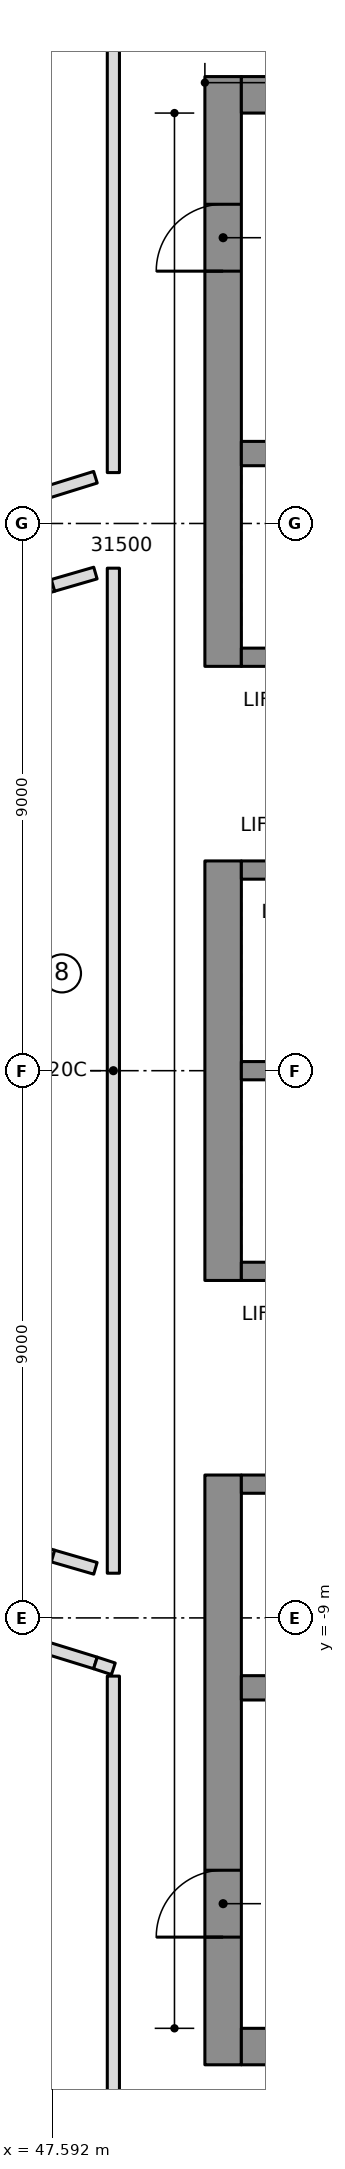
"""IFC4 building model, lengths in metres.
Left out: names, types, materials, properties, quantities, classifications, styles, units other than length and angle.
Written with IfcOpenShell. Run it as: python <this file> out.ifc"""

import sys

from ifc_helpers import new_model, si_unit, direction, frame, frame_2d, origin, place, context, subcontext, project, spatial, rectangle, extrude, element, fill, save


model = new_model("IFC4")
c1 = context("Model", 3, precision=1e-05, world=origin(), true_north=direction((0.0, 1.0)))
c2 = subcontext(c1, "Body", "Model", "MODEL_VIEW")
j1 = project(units=[si_unit("LENGTHUNIT", "METRE"), si_unit("PLANEANGLEUNIT", "RADIAN")], contexts=[c1])
p1 = place(None, origin())
s1 = spatial("IfcSite", under=j1, at=p1, CompositionType="ELEMENT")
p2 = place(p1, origin())
s2 = spatial("IfcBuilding", under=s1, at=p2, CompositionType="ELEMENT")
p3 = place(p2, frame((0.0, 0.0, 235.0)))
s3 = spatial("IfcBuildingStorey", under=s2, at=p3, CompositionType="ELEMENT", Elevation=235.0)
p4 = place(p3, frame((50.4, 6.65, 0.0), z_axis=(0.0, 0.0, 1.0), x_axis=(0.0, 1.0, 0.0)))
e1 = element("IfcWall", 1, at=p4, inside=s3, PredefinedType="SHEAR", context=c2, shape_type="SweptSolid", body=[
    extrude(rectangle(XDim=9.7, YDim=0.6, at=frame_2d((4.85, 0.0))), origin(), (0.0, 0.0, 1.0), 3.55),
])
p5 = place(p4, frame((6.5, 0.0, 0.0)))
e2 = element("IfcOpeningElement", 2, at=p5, cuts=e1, PredefinedType="OPENING", context=c2, shape_type="SweptSolid", body=[
    extrude(rectangle(XDim=1.1, YDim=2.1, at=frame_2d((0.55, 1.05))), frame((0.0, 0.31, 0.0), z_axis=(0.0, -1.0, 0.0), x_axis=(1.0, 0.0, 0.0)), (0.0, 0.0, 1.0), 0.62),
])
p6 = place(p3, frame((50.4, -3.45, 0.0), z_axis=(0.0, 0.0, 1.0), x_axis=(0.0, 1.0, 0.0)))
e3 = element("IfcWall", 3, at=p6, inside=s3, PredefinedType="SHEAR", context=c2, shape_type="SweptSolid", body=[
    extrude(rectangle(XDim=6.9, YDim=0.6, at=frame_2d((3.45, 0.0))), origin(), (0.0, 0.0, 1.0), 3.55),
])
p7 = place(p3, frame((50.4, -16.35, 0.0), z_axis=(0.0, 0.0, 1.0), x_axis=(0.0, 1.0, 0.0)))
e4 = element("IfcWall", 4, at=p7, inside=s3, PredefinedType="SHEAR", context=c2, shape_type="SweptSolid", body=[
    extrude(rectangle(XDim=9.7, YDim=0.6, at=frame_2d((4.85, 0.0))), origin(), (0.0, 0.0, 1.0), 3.55),
])
p8 = place(p7, frame((2.1, 0.0, 0.0)))
e5 = element("IfcOpeningElement", 5, at=p8, cuts=e4, PredefinedType="OPENING", context=c2, shape_type="SweptSolid", body=[
    extrude(rectangle(XDim=1.1, YDim=2.1, at=frame_2d((0.55, 1.05))), frame((0.0, 0.31, 0.0), z_axis=(0.0, -1.0, 0.0), x_axis=(1.0, 0.0, 0.0)), (0.0, 0.0, 1.0), 0.62),
])
for number, where, z_axis, x_axis in (
    (6, (50.7, 16.05, 0.0), (0.0, 0.0, 1.0), (1.0, 0.0, 0.0)),
    (7, (50.7, -16.05, 0.0), (0.0, 0.0, 1.0), (1.0, 0.0, 0.0)),
):
    element("IfcWall", number, at=place(p3, frame(where, z_axis=z_axis, x_axis=x_axis)), inside=s3, PredefinedType="SHEAR", context=c2, shape_type="SweptSolid", body=[
        extrude(rectangle(XDim=13.62, YDim=0.6, at=frame_2d((6.81, 0.0))), origin(), (0.0, 0.0, 1.0), 3.55),
    ])
p9 = place(p3, frame((50.7, 10.15, 0.0), z_axis=(0.0, 0.0, 1.0), x_axis=(1.0, 0.0, 0.0)))
e8 = element("IfcWall", 8, at=p9, inside=s3, PredefinedType="SHEAR", context=c2, shape_type="SweptSolid", body=[
    extrude(rectangle(XDim=13.02, YDim=0.4, at=frame_2d((6.51, 0.0))), origin(), (0.0, 0.0, 1.0), 3.55),
])
p10 = place(p9, frame((0.7, 0.0, 0.0)))
e9 = element("IfcOpeningElement", 9, at=p10, cuts=e8, PredefinedType="OPENING", context=c2, shape_type="SweptSolid", body=[
    extrude(rectangle(XDim=1.1, YDim=2.1, at=frame_2d((0.55, 1.05))), frame((0.0, 0.21, 0.0), z_axis=(0.0, -1.0, 0.0), x_axis=(1.0, 0.0, 0.0)), (0.0, 0.0, 1.0), 0.42),
])
p11 = place(p9, frame((3.5, 0.0, 0.0)))
e10 = element("IfcOpeningElement", 10, at=p11, cuts=e8, PredefinedType="OPENING", context=c2, shape_type="SweptSolid", body=[
    extrude(rectangle(XDim=1.1, YDim=2.1, at=frame_2d((0.55, 1.05))), frame((0.0, 0.21, 0.0), z_axis=(0.0, -1.0, 0.0), x_axis=(1.0, 0.0, 0.0)), (0.0, 0.0, 1.0), 0.42),
])
p12 = place(p3, frame((50.7, -10.15, 0.0), z_axis=(0.0, 0.0, 1.0), x_axis=(1.0, 0.0, 0.0)))
e11 = element("IfcWall", 11, at=p12, inside=s3, PredefinedType="SHEAR", context=c2, shape_type="SweptSolid", body=[
    extrude(rectangle(XDim=13.02, YDim=0.4, at=frame_2d((6.51, 0.0))), origin(), (0.0, 0.0, 1.0), 3.55),
])
p13 = place(p3, frame((50.7, 0.0, 0.0), z_axis=(0.0, 0.0, 1.0), x_axis=(1.0, 0.0, 0.0)))
e12 = element("IfcWall", 12, at=p13, inside=s3, PredefinedType="SHEAR", context=c2, shape_type="SweptSolid", body=[
    extrude(rectangle(XDim=10.9, YDim=0.3, at=frame_2d((5.45, 0.0))), origin(), (0.0, 0.0, 1.0), 3.55),
])
p14 = place(p3, frame((50.7, 3.3, 0.0), z_axis=(0.0, 0.0, 1.0), x_axis=(1.0, 0.0, 0.0)))
e13 = element("IfcWall", 13, at=p14, inside=s3, PredefinedType="SHEAR", context=c2, shape_type="SweptSolid", body=[
    extrude(rectangle(XDim=10.9, YDim=0.3, at=frame_2d((5.45, 0.0))), origin(), (0.0, 0.0, 1.0), 3.55),
])
p15 = place(p14, frame((0.7, 0.0, 0.0)))
e14 = element("IfcOpeningElement", 14, at=p15, cuts=e13, PredefinedType="OPENING", context=c2, shape_type="SweptSolid", body=[
    extrude(rectangle(XDim=1.1, YDim=2.1, at=frame_2d((0.55, 1.05))), frame((0.0, 0.16, 0.0), z_axis=(0.0, -1.0, 0.0), x_axis=(1.0, 0.0, 0.0)), (0.0, 0.0, 1.0), 0.32),
])
p16 = place(p14, frame((3.5, 0.0, 0.0)))
e15 = element("IfcOpeningElement", 15, at=p16, cuts=e13, PredefinedType="OPENING", context=c2, shape_type="SweptSolid", body=[
    extrude(rectangle(XDim=1.1, YDim=2.1, at=frame_2d((0.55, 1.05))), frame((0.0, 0.16, 0.0), z_axis=(0.0, -1.0, 0.0), x_axis=(1.0, 0.0, 0.0)), (0.0, 0.0, 1.0), 0.32),
])
p17 = place(p14, frame((6.4, 0.0, 0.0)))
e16 = element("IfcOpeningElement", 16, at=p17, cuts=e13, PredefinedType="OPENING", context=c2, shape_type="SweptSolid", body=[
    extrude(rectangle(XDim=0.9, YDim=2.1, at=frame_2d((0.45, 1.05))), frame((0.0, 0.16, 0.0), z_axis=(0.0, -1.0, 0.0), x_axis=(1.0, 0.0, 0.0)), (0.0, 0.0, 1.0), 0.32),
])
p18 = place(p14, frame((9.2, 0.0, 0.0)))
e17 = element("IfcOpeningElement", 17, at=p18, cuts=e13, PredefinedType="OPENING", context=c2, shape_type="SweptSolid", body=[
    extrude(rectangle(XDim=0.9, YDim=2.1, at=frame_2d((0.45, 1.05))), frame((0.0, 0.16, 0.0), z_axis=(0.0, -1.0, 0.0), x_axis=(1.0, 0.0, 0.0)), (0.0, 0.0, 1.0), 0.32),
])
p19 = place(p3, frame((50.7, 6.8, 0.0), z_axis=(0.0, 0.0, 1.0), x_axis=(1.0, 0.0, 0.0)))
e18 = element("IfcWall", 18, at=p19, inside=s3, PredefinedType="SHEAR", context=c2, shape_type="SweptSolid", body=[
    extrude(rectangle(XDim=10.9, YDim=0.3, at=frame_2d((5.45, 0.0))), origin(), (0.0, 0.0, 1.0), 3.55),
])
p20 = place(p19, frame((6.4, 0.0, 0.0)))
e19 = element("IfcOpeningElement", 19, at=p20, cuts=e18, PredefinedType="OPENING", context=c2, shape_type="SweptSolid", body=[
    extrude(rectangle(XDim=0.9, YDim=2.1, at=frame_2d((0.45, 1.05))), frame((0.0, 0.16, 0.0), z_axis=(0.0, -1.0, 0.0), x_axis=(1.0, 0.0, 0.0)), (0.0, 0.0, 1.0), 0.32),
])
p21 = place(p19, frame((9.2, 0.0, 0.0)))
e20 = element("IfcOpeningElement", 20, at=p21, cuts=e18, PredefinedType="OPENING", context=c2, shape_type="SweptSolid", body=[
    extrude(rectangle(XDim=0.9, YDim=2.1, at=frame_2d((0.45, 1.05))), frame((0.0, 0.16, 0.0), z_axis=(0.0, -1.0, 0.0), x_axis=(1.0, 0.0, 0.0)), (0.0, 0.0, 1.0), 0.32),
])
p22 = place(p3, frame((50.7, -3.3, 0.0), z_axis=(0.0, 0.0, 1.0), x_axis=(1.0, 0.0, 0.0)))
e21 = element("IfcWall", 21, at=p22, inside=s3, PredefinedType="SHEAR", context=c2, shape_type="SweptSolid", body=[
    extrude(rectangle(XDim=10.9, YDim=0.3, at=frame_2d((5.45, 0.0))), origin(), (0.0, 0.0, 1.0), 3.55),
])
p23 = place(p22, frame((9.1, 0.0, 0.0)))
e22 = element("IfcOpeningElement", 22, at=p23, cuts=e21, PredefinedType="OPENING", context=c2, shape_type="SweptSolid", body=[
    extrude(rectangle(XDim=1.1, YDim=2.1, at=frame_2d((0.55, 1.05))), frame((0.0, 0.16, 0.0), z_axis=(0.0, -1.0, 0.0), x_axis=(1.0, 0.0, 0.0)), (0.0, 0.0, 1.0), 0.32),
])
p24 = place(p3, frame((50.7, -6.8, 0.0), z_axis=(0.0, 0.0, 1.0), x_axis=(1.0, 0.0, 0.0)))
e23 = element("IfcWall", 23, at=p24, inside=s3, PredefinedType="SHEAR", context=c2, shape_type="SweptSolid", body=[
    extrude(rectangle(XDim=10.9, YDim=0.3, at=frame_2d((5.45, 0.0))), origin(), (0.0, 0.0, 1.0), 3.55),
])
p25 = place(p24, frame((6.3, 0.0, 0.0)))
e24 = element("IfcOpeningElement", 24, at=p25, cuts=e23, PredefinedType="OPENING", context=c2, shape_type="SweptSolid", body=[
    extrude(rectangle(XDim=1.1, YDim=2.1, at=frame_2d((0.55, 1.05))), frame((0.0, 0.16, 0.0), z_axis=(0.0, -1.0, 0.0), x_axis=(1.0, 0.0, 0.0)), (0.0, 0.0, 1.0), 0.32),
])
p26 = place(p24, frame((9.1, 0.0, 0.0)))
e25 = element("IfcOpeningElement", 25, at=p26, cuts=e23, PredefinedType="OPENING", context=c2, shape_type="SweptSolid", body=[
    extrude(rectangle(XDim=1.1, YDim=2.1, at=frame_2d((0.55, 1.05))), frame((0.0, 0.16, 0.0), z_axis=(0.0, -1.0, 0.0), x_axis=(1.0, 0.0, 0.0)), (0.0, 0.0, 1.0), 0.32),
])
p27 = place(p24, frame((0.8, 0.0, 0.0)))
e26 = element("IfcOpeningElement", 26, at=p27, cuts=e23, PredefinedType="OPENING", context=c2, shape_type="SweptSolid", body=[
    extrude(rectangle(XDim=0.9, YDim=2.1, at=frame_2d((0.45, 1.05))), frame((0.0, 0.16, 0.0), z_axis=(0.0, -1.0, 0.0), x_axis=(1.0, 0.0, 0.0)), (0.0, 0.0, 1.0), 0.32),
])
p28 = place(p24, frame((3.6, 0.0, 0.0)))
e27 = element("IfcOpeningElement", 27, at=p28, cuts=e23, PredefinedType="OPENING", context=c2, shape_type="SweptSolid", body=[
    extrude(rectangle(XDim=0.9, YDim=2.1, at=frame_2d((0.45, 1.05))), frame((0.0, 0.16, 0.0), z_axis=(0.0, -1.0, 0.0), x_axis=(1.0, 0.0, 0.0)), (0.0, 0.0, 1.0), 0.32),
])
for number, where, z_axis, x_axis in (
    (28, (46.85, 7.748, 0.0), (0.0, 0.0, 1.0), (0.955, 0.298, 0.0)),
    (29, (47.602, -7.982, 0.0), (0.0, 0.0, 1.0), (-0.955, 0.298, 0.0)),
):
    element("IfcWall", number, at=place(p3, frame(where, z_axis=z_axis, x_axis=x_axis)), inside=s3, PredefinedType="PARTITIONING", context=c2, shape_type="SweptSolid", body=[
        extrude(rectangle(XDim=0.788, YDim=0.2, at=frame_2d((0.394, 0.0))), origin(), (0.0, 0.0, 1.0), 3.25),
    ])
p29 = place(p3, frame((41.898, 7.764, 0.0), z_axis=(0.0, 0.0, 1.0), x_axis=(0.954667015156, 0.297675813886, 0.0)))
e30 = element("IfcWall", 30, at=p29, inside=s3, PredefinedType="PARTITIONING", context=c2, shape_type="SweptSolid", body=[
    extrude(rectangle(XDim=6.706, YDim=0.2, at=frame_2d((3.353, 0.0))), origin(), (0.0, 0.0, 1.0), 3.25),
])
p30 = place(p29, frame((3.95, 0.0, 0.0)))
e31 = element("IfcOpeningElement", 31, at=p30, cuts=e30, PredefinedType="OPENING", context=c2, shape_type="SweptSolid", body=[
    extrude(rectangle(XDim=1.5, YDim=2.1, at=frame_2d((0.75, 1.05))), frame((0.0, 0.11, 0.0), z_axis=(0.0, -1.0, 0.0), x_axis=(1.0, 0.0, 0.0)), (0.0, 0.0, 1.0), 0.22),
])
p31 = place(p3, frame((41.898, -7.764, 0.0), z_axis=(0.0, 0.0, 1.0), x_axis=(0.955502033518, -0.294984514752, 0.0)))
e32 = element("IfcWall", 32, at=p31, inside=s3, PredefinedType="PARTITIONING", context=c2, shape_type="SweptSolid", body=[
    extrude(rectangle(XDim=6.7, YDim=0.2, at=frame_2d((3.35, 0.0))), origin(), (0.0, 0.0, 1.0), 3.25),
])
p32 = place(p31, frame((3.95, 0.0, 0.0)))
e33 = element("IfcOpeningElement", 33, at=p32, cuts=e32, PredefinedType="OPENING", context=c2, shape_type="SweptSolid", body=[
    extrude(rectangle(XDim=1.5, YDim=2.1, at=frame_2d((0.75, 1.05))), frame((0.0, 0.11, 0.0), z_axis=(0.0, -1.0, 0.0), x_axis=(1.0, 0.0, 0.0)), (0.0, 0.0, 1.0), 0.22),
])
for number, where, z_axis, x_axis in (
    (34, (47.602, 7.982, 0.0), (0.0, 0.0, 1.0), (0.96, 0.278, 0.0)),
    (35, (48.3, -8.185, 0.0), (0.0, 0.0, 1.0), (-0.96, 0.278, 0.0)),
):
    element("IfcWall", number, at=place(p3, frame(where, z_axis=z_axis, x_axis=x_axis)), inside=s3, PredefinedType="PARTITIONING", context=c2, shape_type="SweptSolid", body=[
        extrude(rectangle(XDim=0.727, YDim=0.2, at=frame_2d((0.363, 0.0))), origin(), (0.0, 0.0, 1.0), 3.25),
    ])
p33 = place(p3, frame((48.595, 8.265, 0.0), z_axis=(0.0, 0.0, 1.0), x_axis=(0.0, -1.0, 0.0)))
e36 = element("IfcWall", 36, at=p33, inside=s3, PredefinedType="PARTITIONING", context=c2, shape_type="SweptSolid", body=[
    extrude(rectangle(XDim=16.53, YDim=0.2, at=frame_2d((8.265, 0.0))), origin(), (0.0, 0.0, 1.0), 3.25),
])
p34 = place(p3, frame((48.595, 19.904, 0.0), z_axis=(0.0, 0.0, 1.0), x_axis=(0.0, -1.0, 0.0)))
e37 = element("IfcWall", 37, at=p34, inside=s3, PredefinedType="PARTITIONING", context=c2, shape_type="SweptSolid", body=[
    extrude(rectangle(XDim=10.067, YDim=0.2, at=frame_2d((5.034, 0.0))), origin(), (0.0, 0.0, 1.0), 3.25),
])
p35 = place(p3, frame((48.3, -9.741, 0.0), z_axis=(0.0, 0.0, 1.0), x_axis=(0.950709666312, -0.31008245739, 0.0)))
e38 = element("IfcWall", 38, at=p35, inside=s3, PredefinedType="PARTITIONING", context=c2, shape_type="SweptSolid", body=[
    extrude(rectangle(XDim=0.31, YDim=0.2, at=frame_2d((0.155, 0.0))), origin(), (0.0, 0.0, 1.0), 3.25),
])
p36 = place(p3, frame((48.595, -9.957, 0.0), z_axis=(0.0, 0.0, 1.0), x_axis=(0.0, -1.0, 0.0)))
e39 = element("IfcWall", 39, at=p36, inside=s3, PredefinedType="PARTITIONING", context=c2, shape_type="SweptSolid", body=[
    extrude(rectangle(XDim=9.947, YDim=0.2, at=frame_2d((4.974, 0.0))), origin(), (0.0, 0.0, 1.0), 3.25),
])
p37 = place(p5, origin())
e40 = element("IfcDoor", 40, at=p37, inside=s3, OperationType="SINGLE_SWING_RIGHT", PredefinedType="DOOR", context=c2, shape_type="SweptSolid", body=[
    extrude(rectangle(XDim=1.1, YDim=2.1, at=frame_2d((0.55, 1.05))), frame((0.0, 0.025, 0.0), z_axis=(0.0, -1.0, 0.0), x_axis=(1.0, 0.0, 0.0)), (0.0, 0.0, 1.0), 0.05),
])
fill(e2, e40)
p38 = place(p8, origin())
e41 = element("IfcDoor", 41, at=p38, inside=s3, OperationType="SINGLE_SWING_RIGHT", PredefinedType="DOOR", context=c2, shape_type="SweptSolid", body=[
    extrude(rectangle(XDim=1.1, YDim=2.1, at=frame_2d((0.55, 1.05))), frame((0.0, 0.025, 0.0), z_axis=(0.0, -1.0, 0.0), x_axis=(1.0, 0.0, 0.0)), (0.0, 0.0, 1.0), 0.05),
])
fill(e5, e41)
save(model, sys.argv[1])
